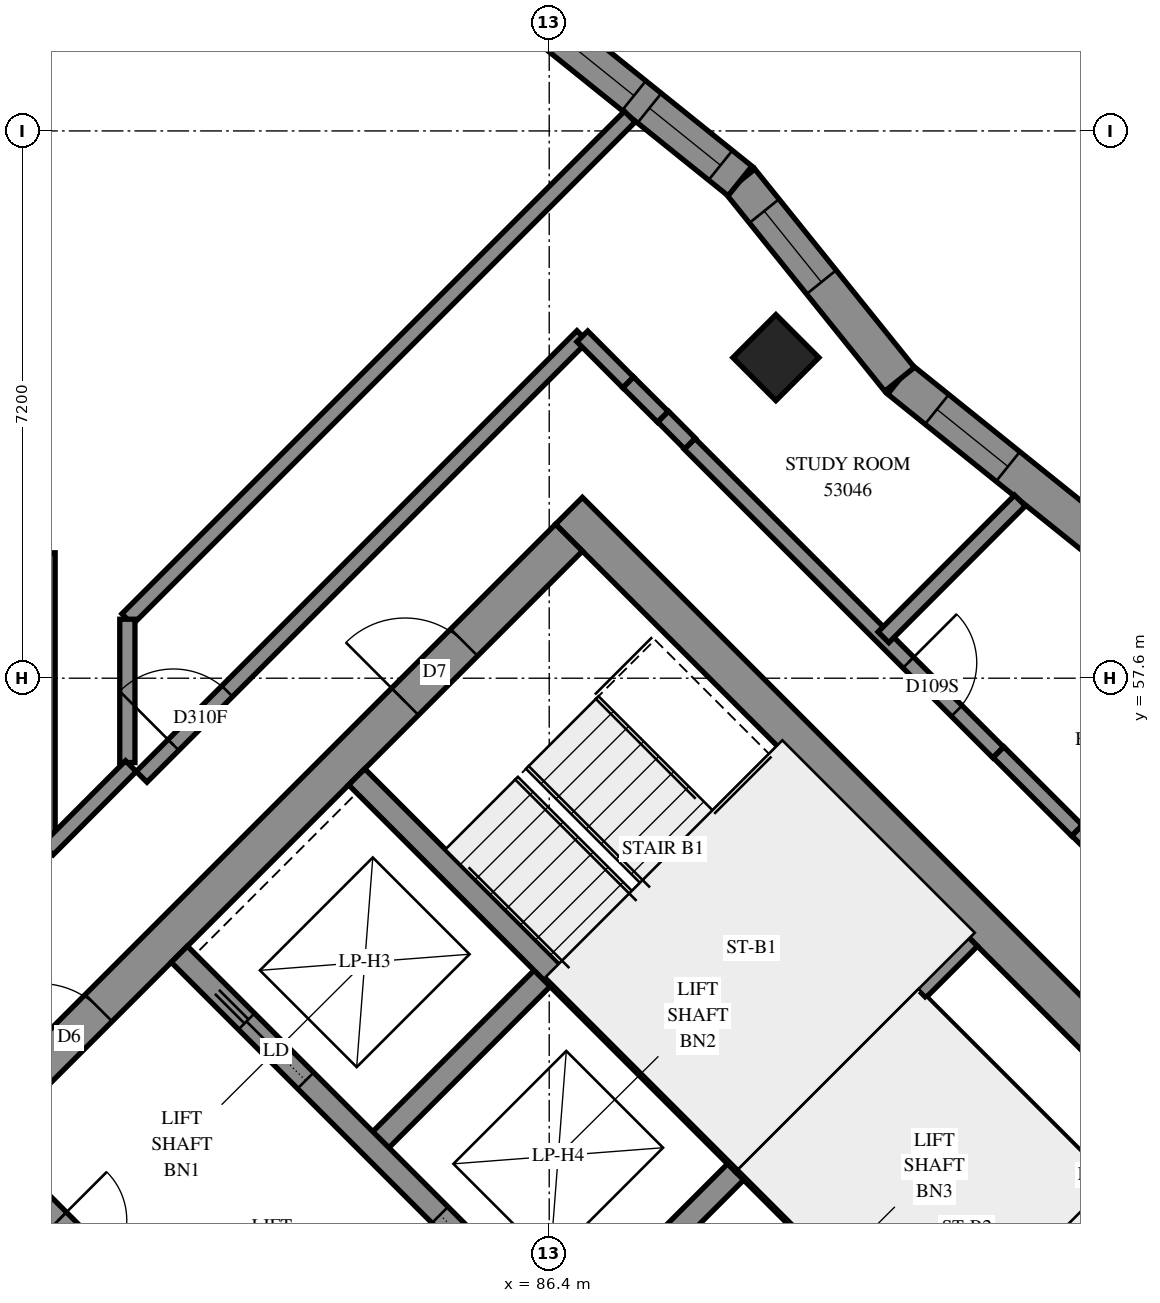
"""IFC4 building model, lengths in metres.
Left out: names, types, materials, properties, quantities, classifications, styles, units other than length and angle.
Written with IfcOpenShell. Run it as: python <this file> out.ifc"""

import sys

from ifc_helpers import new_model, si_unit, direction, frame, frame_2d, origin, origin_2d, place, context, subcontext, project, spatial, polyline, rectangle, outline, extrude, element, fill, save


model = new_model("IFC4")
c1 = context("Model", 3, precision=1e-05, world=origin(), true_north=direction((0.0, 1.0)))
c2 = subcontext(c1, "Body", "Model", "MODEL_VIEW")
j1 = project(units=[si_unit("LENGTHUNIT", "METRE"), si_unit("PLANEANGLEUNIT", "RADIAN")], contexts=[c1])
p1 = place(None, origin())
s1 = spatial("IfcSite", under=j1, at=p1, CompositionType="ELEMENT")
p2 = place(p1, origin())
s2 = spatial("IfcBuilding", under=s1, at=p2, CompositionType="ELEMENT")
p3 = place(p2, frame((0.0, 0.0, 196.4)))
s3 = spatial("IfcBuildingStorey", under=s2, at=p3, CompositionType="ELEMENT", Elevation=196.4)
p4 = place(p3, frame((89.382, 61.818, 0.0), z_axis=(0.0, 0.0, 1.0), x_axis=(0.7071067812, -0.7071067812, 0.0)))
e1 = element("IfcColumn", 1, at=p4, inside=s3, PredefinedType="COLUMN", context=c2, shape_type="SweptSolid", body=[
    extrude(rectangle(XDim=0.8, YDim=0.8, at=origin_2d()), origin(), (0.0, 0.0, 1.0), 3.1),
])
p5 = place(p3, frame((86.66, 59.802, -0.3), z_axis=(0.0, 0.0, 1.0), x_axis=(0.7071067812, -0.7071067812, 0.0)))
e2 = element("IfcWall", 2, at=p5, inside=s3, PredefinedType="SHEAR", context=c2, shape_type="SweptSolid", body=[
    extrude(rectangle(XDim=15.4, YDim=0.5, at=frame_2d((7.7, 0.0))), origin(), (0.0, 0.0, 1.0), 2.7),
])
p6 = place(p5, frame((10.5, 0.0, 0.3)))
e3 = element("IfcOpeningElement", 3, at=p6, cuts=e2, PredefinedType="OPENING", context=c2, shape_type="SweptSolid", body=[
    extrude(rectangle(XDim=0.8, YDim=2.1, at=frame_2d((0.4, 1.05))), frame((0.0, 0.26, 0.0), z_axis=(0.0, -1.0, 0.0), x_axis=(1.0, 0.0, 0.0)), (0.0, 0.0, 1.0), 0.52),
])
p7 = place(p3, frame((76.478, 49.267, -0.3), z_axis=(0.0, 0.0, 1.0), x_axis=(0.7071067812, 0.7071067812, 0.0)))
e4 = element("IfcWall", 4, at=p7, inside=s3, PredefinedType="SHEAR", context=c2, shape_type="SweptSolid", body=[
    extrude(rectangle(XDim=14.4, YDim=0.5, at=frame_2d((7.2, 0.0))), origin(), (0.0, 0.0, 1.0), 2.7),
])
p8 = place(p7, frame((4.55, 0.0, 0.3)))
e5 = element("IfcOpeningElement", 5, at=p8, cuts=e4, PredefinedType="OPENING", context=c2, shape_type="SweptSolid", body=[
    extrude(rectangle(XDim=1.1, YDim=2.1, at=frame_2d((0.55, 1.05))), frame((0.0, 0.26, 0.0), z_axis=(0.0, -1.0, 0.0), x_axis=(1.0, 0.0, 0.0)), (0.0, 0.0, 1.0), 0.52),
])
p9 = place(p7, frame((11.35, 0.0, 0.3)))
e6 = element("IfcOpeningElement", 6, at=p9, cuts=e4, PredefinedType="OPENING", context=c2, shape_type="SweptSolid", body=[
    extrude(rectangle(XDim=1.1, YDim=2.1, at=frame_2d((0.55, 1.05))), frame((0.0, 0.26, 0.0), z_axis=(0.0, -1.0, 0.0), x_axis=(1.0, 0.0, 0.0)), (0.0, 0.0, 1.0), 0.52),
])
p10 = place(p3, frame((84.079, 51.423, 0.0), z_axis=(0.0, 0.0, 1.0), x_axis=(0.7071219326, 0.7070916295, 0.0)))
e7 = element("IfcWall", 7, at=p10, inside=s3, PredefinedType="SOLIDWALL", context=c2, shape_type="SweptSolid", body=[
    extrude(rectangle(XDim=3.3, YDim=0.3, at=frame_2d((1.65, 0.0))), origin(), (0.0, 0.0, 1.0), 3.1),
])
p11 = place(p3, frame((86.625, 48.878, 0.0), z_axis=(0.0, 0.0, 1.0), x_axis=(0.7071067812, 0.7071067812, 0.0)))
e8 = element("IfcWall", 8, at=p11, inside=s3, PredefinedType="SOLIDWALL", context=c2, shape_type="SweptSolid", body=[
    extrude(rectangle(XDim=3.3, YDim=0.3, at=frame_2d((1.65, 0.0))), origin(), (0.0, 0.0, 1.0), 3.1),
])
p12 = place(p3, frame((78.988, 51.423, 0.0), z_axis=(0.0, 0.0, 1.0), x_axis=(0.7071067812, -0.7071067812, 0.0)))
e9 = element("IfcWall", 9, at=p12, inside=s3, PredefinedType="SOLIDWALL", context=c2, shape_type="SweptSolid", body=[
    extrude(rectangle(XDim=14.4, YDim=0.3, at=frame_2d((7.2, 0.0))), origin(), (0.0, 0.0, 1.0), 3.1),
])
p13 = place(p12, frame((1.35, 0.0, 0.0)))
e10 = element("IfcOpeningElement", 10, at=p13, cuts=e9, PredefinedType="OPENING", context=c2, shape_type="SweptSolid", body=[
    extrude(rectangle(XDim=0.9, YDim=2.1, at=frame_2d((0.45, 1.05))), frame((0.0, 0.16, 0.0), z_axis=(0.0, -1.0, 0.0), x_axis=(1.0, 0.0, 0.0)), (0.0, 0.0, 1.0), 0.32),
])
p14 = place(p12, frame((4.95, 0.0, 0.0)))
e11 = element("IfcOpeningElement", 11, at=p14, cuts=e9, PredefinedType="OPENING", context=c2, shape_type="SweptSolid", body=[
    extrude(rectangle(XDim=0.9, YDim=2.1, at=frame_2d((0.45, 1.05))), frame((0.0, 0.16, 0.0), z_axis=(0.0, -1.0, 0.0), x_axis=(1.0, 0.0, 0.0)), (0.0, 0.0, 1.0), 0.32),
])
p15 = place(p12, frame((8.55, 0.0, 0.0)))
e12 = element("IfcOpeningElement", 12, at=p15, cuts=e9, PredefinedType="OPENING", context=c2, shape_type="SweptSolid", body=[
    extrude(rectangle(XDim=0.9, YDim=2.1, at=frame_2d((0.45, 1.05))), frame((0.0, 0.16, 0.0), z_axis=(0.0, -1.0, 0.0), x_axis=(1.0, 0.0, 0.0)), (0.0, 0.0, 1.0), 0.32),
])
p16 = place(p12, frame((12.05, 0.0, 0.0)))
e13 = element("IfcOpeningElement", 13, at=p16, cuts=e9, PredefinedType="OPENING", context=c2, shape_type="SweptSolid", body=[
    extrude(rectangle(XDim=1.1, YDim=2.1, at=frame_2d((0.55, 1.05))), frame((0.0, 0.16, 0.0), z_axis=(0.0, -1.0, 0.0), x_axis=(1.0, 0.0, 0.0)), (0.0, 0.0, 1.0), 0.32),
])
p17 = place(p3, frame((81.534, 53.969, 0.0), z_axis=(0.0, 0.0, 1.0), x_axis=(0.707103309, -0.7071102534, 0.0)))
e14 = element("IfcWall", 14, at=p17, inside=s3, PredefinedType="SOLIDWALL", context=c2, shape_type="SweptSolid", body=[
    extrude(rectangle(XDim=14.4, YDim=0.3, at=frame_2d((7.2, 0.0))), origin(), (0.0, 0.0, 1.0), 3.1),
])
p18 = place(p17, frame((1.25, 0.0, 0.0)))
e15 = element("IfcOpeningElement", 15, at=p18, cuts=e14, PredefinedType="OPENING", context=c2, shape_type="SweptSolid", body=[
    extrude(rectangle(XDim=1.1, YDim=2.1, at=frame_2d((0.55, 1.05))), frame((0.0, 0.16, 0.0), z_axis=(0.0, -1.0, 0.0), x_axis=(1.0, 0.0, 0.0)), (0.0, 0.0, 1.0), 0.32),
])
p19 = place(p17, frame((4.85, 0.0, 0.0)))
e16 = element("IfcOpeningElement", 16, at=p19, cuts=e14, PredefinedType="OPENING", context=c2, shape_type="SweptSolid", body=[
    extrude(rectangle(XDim=1.1, YDim=2.1, at=frame_2d((0.55, 1.05))), frame((0.0, 0.16, 0.0), z_axis=(0.0, -1.0, 0.0), x_axis=(1.0, 0.0, 0.0)), (0.0, 0.0, 1.0), 0.32),
])
p20 = place(p17, frame((8.45, 0.0, 0.0)))
e17 = element("IfcOpeningElement", 17, at=p20, cuts=e14, PredefinedType="OPENING", context=c2, shape_type="SweptSolid", body=[
    extrude(rectangle(XDim=1.1, YDim=2.1, at=frame_2d((0.55, 1.05))), frame((0.0, 0.16, 0.0), z_axis=(0.0, -1.0, 0.0), x_axis=(1.0, 0.0, 0.0)), (0.0, 0.0, 1.0), 0.32),
])
p21 = place(p17, frame((12.05, 0.0, 0.0)))
e18 = element("IfcOpeningElement", 18, at=p21, cuts=e14, PredefinedType="OPENING", context=c2, shape_type="SweptSolid", body=[
    extrude(rectangle(XDim=1.1, YDim=2.1, at=frame_2d((0.55, 1.05))), frame((0.0, 0.16, 0.0), z_axis=(0.0, -1.0, 0.0), x_axis=(1.0, 0.0, 0.0)), (0.0, 0.0, 1.0), 0.32),
])
for number, where, z_axis, x_axis in (
    (19, (83.867, 56.302, 0.0), (0.0, 0.0, 1.0), (0.707, -0.707, 0.0)),
    (20, (88.958, 51.211, 0.0), (0.0, 0.0, 1.0), (0.707, -0.707, 0.0)),
):
    element("IfcWall", number, at=place(p3, frame(where, z_axis=z_axis, x_axis=x_axis)), inside=s3, PredefinedType="SOLIDWALL", context=c2, shape_type="SweptSolid", body=[
        extrude(rectangle(XDim=7.2, YDim=0.3, at=frame_2d((3.6, 0.0))), origin(), (0.0, 0.0, 1.0), 3.1),
    ])
p22 = place(p3, frame((88.958, 51.211, 0.0), z_axis=(0.0, 0.0, 1.0), x_axis=(0.7071067812, 0.7071067812, 0.0)))
e21 = element("IfcWall", 21, at=p22, inside=s3, PredefinedType="SOLIDWALL", context=c2, shape_type="SweptSolid", body=[
    extrude(rectangle(XDim=4.2, YDim=0.3, at=frame_2d((2.1, 0.0))), origin(), (0.0, 0.0, 1.0), 3.1),
])
p23 = place(p3, frame((93.619, 59.433, 0.0), z_axis=(0.0, 0.0, 1.0), x_axis=(-0.7792026718, 0.6267720449, 0.0)))
e22 = element("IfcWall", 22, at=p23, inside=s3, PredefinedType="SOLIDWALL", context=c2, shape_type="SweptSolid", body=[
    extrude(outline(polyline([(-0.027, -0.25), (3.322, -0.25), (3.376, 0.25), (0.027, 0.25), (-0.027, -0.25)])), origin(), (0.0, 0.0, 1.0), 3.1),
])
p24 = place(p23, frame((1.519, 0.0, 0.45)))
e23 = element("IfcOpeningElement", 23, at=p24, cuts=e22, PredefinedType="OPENING", context=c2, shape_type="SweptSolid", body=[
    extrude(rectangle(XDim=1.2, YDim=2.5, at=frame_2d((0.6, 1.25))), frame((0.0, 0.26, 0.0), z_axis=(0.0, -1.0, 0.0), x_axis=(1.0, 0.0, 0.0)), (0.0, 0.0, 1.0), 0.52),
])
p25 = place(p3, frame((91.009, 61.532, 0.0), z_axis=(0.0, 0.0, 1.0), x_axis=(-0.6267539152, 0.7792172545, 0.0)))
e24 = element("IfcWall", 24, at=p25, inside=s3, PredefinedType="SOLIDWALL", context=c2, shape_type="SweptSolid", body=[
    extrude(outline(polyline([(0.027, -0.25), (3.376, -0.25), (3.322, 0.25), (-0.027, 0.25), (0.027, -0.25)])), origin(), (0.0, 0.0, 1.0), 3.1),
])
p26 = place(p25, frame((1.641, 0.0, 0.45)))
e25 = element("IfcOpeningElement", 25, at=p26, cuts=e24, PredefinedType="OPENING", context=c2, shape_type="SweptSolid", body=[
    extrude(rectangle(XDim=1.2, YDim=2.5, at=frame_2d((0.6, 1.25))), frame((0.0, 0.26, 0.0), z_axis=(0.0, -1.0, 0.0), x_axis=(1.0, 0.0, 0.0)), (0.0, 0.0, 1.0), 0.52),
])
p27 = place(p3, frame((88.91, 64.142, 0.0), z_axis=(0.0, 0.0, 1.0), x_axis=(-0.7792172545, 0.6267539152, 0.0)))
e26 = element("IfcWall", 26, at=p27, inside=s3, PredefinedType="SOLIDWALL", context=c2, shape_type="SweptSolid", body=[
    extrude(outline(polyline([(-0.027, -0.25), (3.322, -0.25), (3.376, 0.25), (0.027, 0.25), (-0.027, -0.25)])), origin(), (0.0, 0.0, 1.0), 3.1),
])
p28 = place(p27, frame((0.33, 0.0, 0.45)))
e27 = element("IfcOpeningElement", 27, at=p28, cuts=e26, PredefinedType="OPENING", context=c2, shape_type="SweptSolid", body=[
    extrude(rectangle(XDim=1.2, YDim=2.5, at=frame_2d((0.6, 1.25))), frame((0.0, 0.26, 0.0), z_axis=(0.0, -1.0, 0.0), x_axis=(1.0, 0.0, 0.0)), (0.0, 0.0, 1.0), 0.52),
])
p29 = place(p27, frame((1.791, 0.0, 0.45)))
e28 = element("IfcOpeningElement", 28, at=p29, cuts=e26, PredefinedType="OPENING", context=c2, shape_type="SweptSolid", body=[
    extrude(rectangle(XDim=1.2, YDim=2.5, at=frame_2d((0.6, 1.25))), frame((0.0, 0.26, 0.0), z_axis=(0.0, -1.0, 0.0), x_axis=(1.0, 0.0, 0.0)), (0.0, 0.0, 1.0), 0.52),
])
p30 = place(p3, frame((91.313, 53.354, 0.0), z_axis=(0.0, 0.0, 1.0), x_axis=(0.7071147811, -0.7070987812, 0.0)))
e29 = element("IfcWall", 29, at=p30, inside=s3, PredefinedType="PARTITIONING", context=c2, shape_type="SweptSolid", body=[
    extrude(rectangle(XDim=6.25, YDim=0.15, at=frame_2d((3.125, 0.0))), origin(), (0.0, 0.0, 1.0), 3.1),
])
p31 = place(p3, frame((80.849, 58.377, 0.0), z_axis=(0.0, 0.0, 1.0), x_axis=(0.7071121294, 0.7071014329, 0.0)))
e30 = element("IfcWall", 30, at=p31, inside=s3, PredefinedType="PARTITIONING", context=c2, shape_type="SweptSolid", body=[
    extrude(rectangle(XDim=9.349, YDim=0.2, at=frame_2d((4.675, 0.0))), origin(), (0.0, 0.0, 1.0), 3.1),
])
p32 = place(p3, frame((93.346, 55.599, 0.0), z_axis=(0.0, 0.0, 1.0), x_axis=(0.7071067812, -0.7071067812, 0.0)))
e31 = element("IfcWall", 31, at=p32, inside=s3, PredefinedType="PARTITIONING", context=c2, shape_type="SweptSolid", body=[
    extrude(rectangle(XDim=9.201, YDim=0.2, at=frame_2d((4.601, 0.0))), origin(), (0.0, 0.0, 1.0), 3.1),
])
p33 = place(p3, frame((81.037, 56.303, 0.0), z_axis=(0.0, 0.0, 1.0), x_axis=(0.7071067812, 0.7071067812, 0.0)))
e32 = element("IfcWall", 32, at=p33, inside=s3, PredefinedType="PARTITIONING", context=c2, shape_type="SweptSolid", body=[
    extrude(rectangle(XDim=8.2, YDim=0.2, at=frame_2d((4.1, 0.0))), origin(), (0.0, 0.0, 1.0), 3.1),
])
p34 = place(p33, frame((0.592, 0.0, 0.0)))
e33 = element("IfcOpeningElement", 33, at=p34, cuts=e32, PredefinedType="OPENING", context=c2, shape_type="SweptSolid", body=[
    extrude(rectangle(XDim=1.0, YDim=2.1, at=frame_2d((0.5, 1.05))), frame((0.0, 0.11, 0.0), z_axis=(0.0, -1.0, 0.0), x_axis=(1.0, 0.0, 0.0)), (0.0, 0.0, 1.0), 0.22),
])
p35 = place(p3, frame((88.247, 60.683, 0.0), z_axis=(0.0, 0.0, 1.0), x_axis=(0.7071067812, -0.7071067812, 0.0)))
e34 = element("IfcWall", 34, at=p35, inside=s3, PredefinedType="PARTITIONING", context=c2, shape_type="SweptSolid", body=[
    extrude(rectangle(XDim=5.742, YDim=0.2, at=frame_2d((2.871, 0.0))), origin(), (0.0, 0.0, 1.0), 3.1),
])
p36 = place(p35, frame((4.069, 0.0, 0.0)))
e35 = element("IfcOpeningElement", 35, at=p36, cuts=e34, PredefinedType="OPENING", context=c2, shape_type="SweptSolid", body=[
    extrude(rectangle(XDim=0.9, YDim=2.1, at=frame_2d((0.45, 1.05))), frame((0.0, 0.11, 0.0), z_axis=(0.0, -1.0, 0.0), x_axis=(1.0, 0.0, 0.0)), (0.0, 0.0, 1.0), 0.22),
])
p37 = place(p3, frame((79.8, 55.35, 0.0), z_axis=(0.0, 0.0, 1.0), x_axis=(0.0, 1.0, 0.0)))
e36 = element("IfcWall", 36, at=p37, inside=s3, PredefinedType="PARTITIONING", context=c2, shape_type="SweptSolid", body=[
    extrude(rectangle(XDim=3.9, YDim=0.2, at=frame_2d((1.95, 0.0))), origin(), (0.0, 0.0, 1.0), 3.1),
])
p38 = place(p3, frame((90.797, 58.139, 0.0), z_axis=(0.0, 0.0, 1.0), x_axis=(0.7066541826, 0.7075590903, 0.0)))
e37 = element("IfcWall", 37, at=p38, inside=s3, PredefinedType="PARTITIONING", context=c2, shape_type="SweptSolid", body=[
    extrude(rectangle(XDim=2.542, YDim=0.2, at=frame_2d((1.271, 0.0))), origin(), (0.0, 0.0, 1.0), 3.1),
])
p39 = place(p3, frame((80.85, 56.49, 0.0), z_axis=(0.0, 0.0, 1.0), x_axis=(0.0, 1.0, 0.0)))
e38 = element("IfcWall", 38, at=p39, inside=s3, PredefinedType="PARTITIONING", context=c2, shape_type="SweptSolid", body=[
    extrude(rectangle(XDim=1.886, YDim=0.2, at=frame_2d((0.943, 0.0))), origin(), (0.0, 0.0, 1.0), 3.1),
])
p40 = place(p3, frame((79.803, 55.347, 0.0), z_axis=(0.0, 0.0, 1.0), x_axis=(0.706460727, 0.7077522457, 0.0)))
e39 = element("IfcWall", 39, at=p40, inside=s3, PredefinedType="PARTITIONING", context=c2, shape_type="SweptSolid", body=[
    extrude(rectangle(XDim=1.549, YDim=0.2, at=frame_2d((0.774, 0.0))), origin(), (0.0, 0.0, 1.0), 3.1),
])
p41 = place(p3, frame((92.311, 56.627, 0.0), z_axis=(0.0, 0.0, 1.0), x_axis=(0.7077922938, -0.7064206033, 0.0)))
e40 = element("IfcWall", 40, at=p41, inside=s3, PredefinedType="PARTITIONING", context=c2, shape_type="SweptSolid", body=[
    extrude(rectangle(XDim=1.458, YDim=0.2, at=frame_2d((0.729, 0.0))), origin(), (0.0, 0.0, 1.0), 3.1),
])
p42 = place(p3, frame((86.835, 62.097, 0.0), z_axis=(0.0, 0.0, 1.0), x_axis=(0.7059370453, -0.7082745852, 0.0)))
e41 = element("IfcWall", 41, at=p42, inside=s3, PredefinedType="PARTITIONING", context=c2, shape_type="SweptSolid", body=[
    extrude(rectangle(XDim=0.856, YDim=0.2, at=frame_2d((0.428, 0.0))), origin(), (0.0, 0.0, 1.0), 3.1),
])
p43 = place(p3, frame((87.44, 61.492, 0.0), z_axis=(0.0, 0.0, 1.0), x_axis=(0.7086591505, -0.7055509963, 0.0)))
e42 = element("IfcWall", 42, at=p43, inside=s3, PredefinedType="PARTITIONING", context=c2, shape_type="SweptSolid", body=[
    extrude(rectangle(XDim=0.643, YDim=0.2, at=frame_2d((0.322, 0.0))), origin(), (0.0, 0.0, 1.0), 3.1),
])
p44 = place(p3, frame((87.899, 61.041, 0.0), z_axis=(0.0, 0.0, 1.0), x_axis=(0.7051008166, -0.7091070712, 0.0)))
e43 = element("IfcWall", 43, at=p44, inside=s3, PredefinedType="PARTITIONING", context=c2, shape_type="SweptSolid", body=[
    extrude(rectangle(XDim=0.499, YDim=0.2, at=frame_2d((0.25, 0.0))), origin(), (0.0, 0.0, 1.0), 3.1),
])
p45 = place(p24, origin())
e44 = element("IfcWindow", 44, at=p45, inside=s3, PartitioningType="SINGLE_PANEL", PredefinedType="WINDOW", context=c2, shape_type="SweptSolid", body=[
    extrude(rectangle(XDim=1.2, YDim=2.5, at=frame_2d((0.6, 1.25))), frame((0.0, 0.18, 0.0), z_axis=(0.0, -1.0, 0.0), x_axis=(1.0, 0.0, 0.0)), (0.0, 0.0, 1.0), 0.06),
])
fill(e23, e44)
p46 = place(p26, origin())
e45 = element("IfcWindow", 45, at=p46, inside=s3, PartitioningType="SINGLE_PANEL", PredefinedType="WINDOW", context=c2, shape_type="SweptSolid", body=[
    extrude(rectangle(XDim=1.2, YDim=2.5, at=frame_2d((0.6, 1.25))), frame((0.0, 0.18, 0.0), z_axis=(0.0, -1.0, 0.0), x_axis=(1.0, 0.0, 0.0)), (0.0, 0.0, 1.0), 0.06),
])
fill(e25, e45)
p47 = place(p28, origin())
e46 = element("IfcWindow", 46, at=p47, inside=s3, PartitioningType="SINGLE_PANEL", PredefinedType="WINDOW", context=c2, shape_type="SweptSolid", body=[
    extrude(rectangle(XDim=1.2, YDim=2.5, at=frame_2d((0.6, 1.25))), frame((0.0, 0.18, 0.0), z_axis=(0.0, -1.0, 0.0), x_axis=(1.0, 0.0, 0.0)), (0.0, 0.0, 1.0), 0.06),
])
fill(e27, e46)
p48 = place(p29, origin())
e47 = element("IfcWindow", 47, at=p48, inside=s3, PartitioningType="SINGLE_PANEL", PredefinedType="WINDOW", context=c2, shape_type="SweptSolid", body=[
    extrude(rectangle(XDim=1.2, YDim=2.5, at=frame_2d((0.6, 1.25))), frame((0.0, 0.18, 0.0), z_axis=(0.0, -1.0, 0.0), x_axis=(1.0, 0.0, 0.0)), (0.0, 0.0, 1.0), 0.06),
])
fill(e28, e47)
p49 = place(p8, origin())
e48 = element("IfcDoor", 48, at=p49, inside=s3, OperationType="DOUBLE_DOOR_SINGLE_SWING", PredefinedType="DOOR", context=c2, shape_type="SweptSolid", body=[
    extrude(rectangle(XDim=1.1, YDim=2.1, at=frame_2d((0.55, 1.05))), frame((0.0, 0.025, 0.0), z_axis=(0.0, -1.0, 0.0), x_axis=(1.0, 0.0, 0.0)), (0.0, 0.0, 1.0), 0.05),
])
fill(e5, e48)
p50 = place(p9, origin())
e49 = element("IfcDoor", 49, at=p50, inside=s3, OperationType="SINGLE_SWING_LEFT", PredefinedType="DOOR", context=c2, shape_type="SweptSolid", body=[
    extrude(rectangle(XDim=1.1, YDim=2.1, at=frame_2d((0.55, 1.05))), frame((0.0, 0.025, 0.0), z_axis=(0.0, -1.0, 0.0), x_axis=(1.0, 0.0, 0.0)), (0.0, 0.0, 1.0), 0.05),
])
fill(e6, e49)
p51 = place(p13, origin())
e50 = element("IfcDoor", 50, at=p51, inside=s3, OperationType="SINGLE_SWING_LEFT", PredefinedType="DOOR", context=c2, shape_type="SweptSolid", body=[
    extrude(rectangle(XDim=0.9, YDim=2.1, at=frame_2d((0.45, 1.05))), frame((0.0, 0.025, 0.0), z_axis=(0.0, -1.0, 0.0), x_axis=(1.0, 0.0, 0.0)), (0.0, 0.0, 1.0), 0.05),
])
fill(e10, e50)
p52 = place(p18, origin())
e51 = element("IfcDoor", 51, at=p52, inside=s3, OperationType="SLIDING_TO_LEFT", PredefinedType="DOOR", context=c2, shape_type="SweptSolid", body=[
    extrude(rectangle(XDim=1.1, YDim=2.1, at=frame_2d((0.55, 1.05))), frame((0.0, 0.025, 0.0), z_axis=(0.0, -1.0, 0.0), x_axis=(1.0, 0.0, 0.0)), (0.0, 0.0, 1.0), 0.05),
])
fill(e15, e51)
p53 = place(p19, origin())
e52 = element("IfcDoor", 52, at=p53, inside=s3, OperationType="SLIDING_TO_RIGHT", PredefinedType="DOOR", context=c2, shape_type="SweptSolid", body=[
    extrude(rectangle(XDim=1.1, YDim=2.1, at=frame_2d((0.55, 1.05))), frame((0.0, 0.025, 0.0), z_axis=(0.0, -1.0, 0.0), x_axis=(1.0, 0.0, 0.0)), (0.0, 0.0, 1.0), 0.05),
])
fill(e16, e52)
p54 = place(p34, origin())
e53 = element("IfcDoor", 53, at=p54, inside=s3, OperationType="SINGLE_SWING_RIGHT", PredefinedType="DOOR", context=c2, shape_type="SweptSolid", body=[
    extrude(rectangle(XDim=1.0, YDim=2.1, at=frame_2d((0.5, 1.05))), frame((0.0, 0.025, 0.0), z_axis=(0.0, -1.0, 0.0), x_axis=(1.0, 0.0, 0.0)), (0.0, 0.0, 1.0), 0.05),
])
fill(e33, e53)
p55 = place(p36, origin())
e54 = element("IfcDoor", 54, at=p55, inside=s3, OperationType="SINGLE_SWING_RIGHT", PredefinedType="DOOR", context=c2, shape_type="SweptSolid", body=[
    extrude(rectangle(XDim=0.9, YDim=2.1, at=frame_2d((0.45, 1.05))), frame((0.0, 0.025, 0.0), z_axis=(0.0, -1.0, 0.0), x_axis=(1.0, 0.0, 0.0)), (0.0, 0.0, 1.0), 0.05),
])
fill(e35, e54)
save(model, sys.argv[1])
